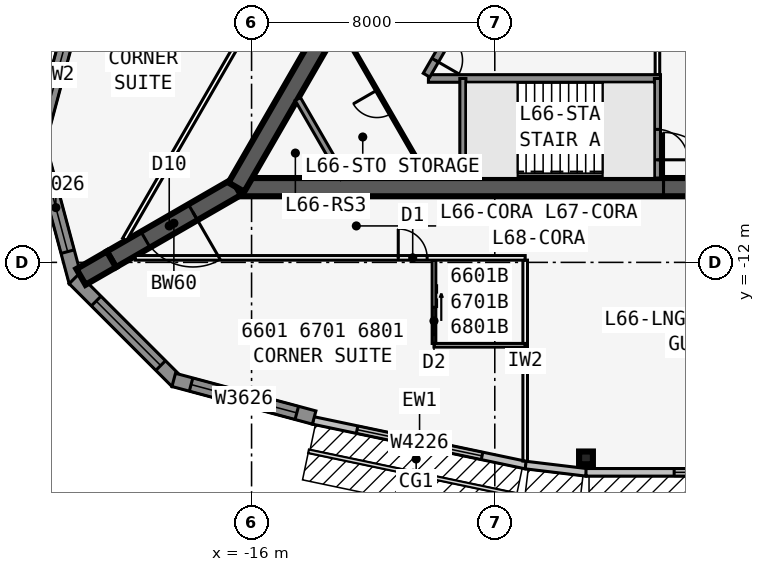
"""IFC4 building model, lengths in metres.
Left out: names, types, materials, properties, quantities, classifications, styles, units other than length and angle.
Written with IfcOpenShell. Run it as: python <this file> out.ifc"""

import sys

from ifc_helpers import new_model, si_unit, direction, frame, frame_2d, origin, origin_2d, place, context, subcontext, project, spatial, polyline, rectangle, i_section, outline, extrude, element, fill, save


model = new_model("IFC4")
c1 = context("Model", 3, precision=1e-05, world=origin(), true_north=direction((0.0, 1.0)))
c2 = subcontext(c1, "Body", "Model", "MODEL_VIEW")
j1 = project(units=[si_unit("LENGTHUNIT", "METRE"), si_unit("PLANEANGLEUNIT", "RADIAN")], contexts=[c1])
p1 = place(None, origin())
s1 = spatial("IfcSite", under=j1, at=p1, CompositionType="ELEMENT")
p2 = place(p1, origin())
s2 = spatial("IfcBuilding", under=s1, at=p2, CompositionType="ELEMENT")
p3 = place(p2, frame((0.0, 0.0, 250.1)))
s3 = spatial("IfcBuildingStorey", under=s2, at=p3, CompositionType="ELEMENT", Elevation=250.1)
p4 = place(p3, frame((-16.5, -9.526, 0.0), z_axis=(0.0, 0.0, 1.0), x_axis=(1.0, 0.0, 0.0)))
e1 = element("IfcWall", 1, at=p4, inside=s3, PredefinedType="SHEAR", context=c2, shape_type="SweptSolid", body=[
    extrude(rectangle(XDim=33.0, YDim=0.6, at=frame_2d((16.5, 0.0))), origin(), (0.0, 0.0, 1.0), 3.6),
])
p5 = place(p4, frame((14.05, 0.0, 0.0)))
e2 = element("IfcOpeningElement", 2, at=p5, cuts=e1, PredefinedType="OPENING", context=c2, shape_type="SweptSolid", body=[
    extrude(rectangle(XDim=1.8, YDim=2.13, at=frame_2d((0.9, 1.065))), frame((0.0, 0.31, 0.0), z_axis=(0.0, -1.0, 0.0), x_axis=(1.0, 0.0, 0.0)), (0.0, 0.0, 1.0), 0.62),
])
p6 = place(p3, frame((-10.183, -5.951, 0.0), z_axis=(0.0, 0.0, 1.0), x_axis=(1.0, 0.0, 0.0)))
e3 = element("IfcWall", 3, at=p6, inside=s3, PredefinedType="SOLIDWALL", context=c2, shape_type="SweptSolid", body=[
    extrude(rectangle(XDim=7.633, YDim=0.25, at=frame_2d((3.816, 0.0))), origin(), (0.0, 0.0, 1.0), 3.435),
])
p7 = place(p3, frame((-9.05, -5.951, 0.0), z_axis=(0.0, 0.0, 1.0), x_axis=(0.0, -1.0, 0.0)))
e4 = element("IfcWall", 4, at=p7, inside=s3, PredefinedType="SOLIDWALL", context=c2, shape_type="SweptSolid", body=[
    extrude(rectangle(XDim=3.275, YDim=0.2, at=frame_2d((1.637, 0.0))), origin(), (0.0, 0.0, 1.0), 3.435),
])
p8 = place(p3, frame((-2.65, -5.951, 0.0), z_axis=(0.0, 0.0, 1.0), x_axis=(0.0, -1.0, 0.0)))
e5 = element("IfcWall", 5, at=p8, inside=s3, PredefinedType="SOLIDWALL", context=c2, shape_type="SweptSolid", body=[
    extrude(rectangle(XDim=3.275, YDim=0.2, at=frame_2d((1.637, 0.0))), origin(), (0.0, 0.0, 1.0), 3.435),
])
p9 = place(p8, frame((1.675, 0.0, 0.0)))
e6 = element("IfcOpeningElement", 6, at=p9, cuts=e5, PredefinedType="OPENING", context=c2, shape_type="SweptSolid", body=[
    extrude(rectangle(XDim=1.0, YDim=2.13, at=frame_2d((0.5, 1.065))), frame((0.0, 0.11, 0.0), z_axis=(0.0, -1.0, 0.0), x_axis=(1.0, 0.0, 0.0)), (0.0, 0.0, 1.0), 0.22),
])
p10 = place(p3, frame((0.0, 19.052, 0.0), z_axis=(0.0, 0.0, 1.0), x_axis=(-0.499999749417, -0.866025548458, 0.0)))
e7 = element("IfcWall", 7, at=p10, inside=s3, PredefinedType="SHEAR", context=c2, shape_type="SweptSolid", body=[
    extrude(rectangle(XDim=33.0, YDim=0.6, at=frame_2d((16.5, 0.0))), origin(), (0.0, 0.0, 1.0), 3.6),
])
p11 = place(p10, frame((14.15, 0.0, 0.0)))
e8 = element("IfcOpeningElement", 8, at=p11, cuts=e7, PredefinedType="OPENING", context=c2, shape_type="SweptSolid", body=[
    extrude(rectangle(XDim=1.8, YDim=2.13, at=frame_2d((0.9, 1.065))), frame((0.0, 0.31, 0.0), z_axis=(0.0, -1.0, 0.0), x_axis=(1.0, 0.0, 0.0)), (0.0, 0.0, 1.0), 0.62),
])
p12 = place(p10, frame((12.6, 0.0, 0.0)))
e9 = element("IfcOpeningElement", 9, at=p12, cuts=e7, PredefinedType="OPENING", context=c2, shape_type="SweptSolid", body=[
    extrude(rectangle(XDim=1.0, YDim=2.13, at=frame_2d((0.5, 1.065))), frame((0.0, 0.31, 0.0), z_axis=(0.0, -1.0, 0.0), x_axis=(1.0, 0.0, 0.0)), (0.0, 0.0, 1.0), 0.62),
])
p13 = place(p3, frame((-4.929, 3.365, 0.0), z_axis=(0.0, 0.0, 1.0), x_axis=(-0.499991433582, -0.866030349552, 0.0)))
e10 = element("IfcWall", 10, at=p13, inside=s3, PredefinedType="SOLIDWALL", context=c2, shape_type="SweptSolid", body=[
    extrude(rectangle(XDim=10.633, YDim=0.25, at=frame_2d((5.316, 0.0))), origin(), (0.0, 0.0, 1.0), 3.435),
])
p14 = place(p13, frame((9.164, 0.0, 0.0)))
e11 = element("IfcOpeningElement", 11, at=p14, cuts=e10, PredefinedType="OPENING", context=c2, shape_type="SweptSolid", body=[
    extrude(rectangle(XDim=0.9, YDim=2.13, at=frame_2d((0.45, 1.065))), frame((0.0, 0.135, 0.0), z_axis=(0.0, -1.0, 0.0), x_axis=(1.0, 0.0, 0.0)), (0.0, 0.0, 1.0), 0.27),
])
p15 = place(p13, frame((1.1, 0.0, 0.0)))
e12 = element("IfcOpeningElement", 12, at=p15, cuts=e10, PredefinedType="OPENING", context=c2, shape_type="SweptSolid", body=[
    extrude(rectangle(XDim=0.9, YDim=2.13, at=frame_2d((0.45, 1.065))), frame((0.0, 0.135, 0.0), z_axis=(0.0, -1.0, 0.0), x_axis=(1.0, 0.0, 0.0)), (0.0, 0.0, 1.0), 0.27),
])
p16 = place(p13, frame((4.0, 0.0, 0.0)))
e13 = element("IfcOpeningElement", 13, at=p16, cuts=e10, PredefinedType="OPENING", context=c2, shape_type="SweptSolid", body=[
    extrude(rectangle(XDim=0.9, YDim=2.13, at=frame_2d((0.45, 1.065))), frame((0.0, 0.135, 0.0), z_axis=(0.0, -1.0, 0.0), x_axis=(1.0, 0.0, 0.0)), (0.0, 0.0, 1.0), 0.27),
])
p17 = place(p3, frame((-16.5, -9.526, 0.0), z_axis=(0.0, 0.0, 1.0), x_axis=(-0.866031398331, -0.499989616998, 0.0)))
e14 = element("IfcWall", 14, at=p17, inside=s3, PredefinedType="SHEAR", context=c2, shape_type="SweptSolid", body=[
    extrude(rectangle(XDim=4.746, YDim=0.6, at=frame_2d((2.373, 0.0))), origin(), (0.0, 0.0, 1.0), 3.6),
])
p18 = place(p17, frame((1.65, 0.0, 0.0)))
e15 = element("IfcOpeningElement", 15, at=p18, cuts=e14, PredefinedType="OPENING", context=c2, shape_type="SweptSolid", body=[
    extrude(rectangle(XDim=1.8, YDim=2.13, at=frame_2d((0.9, 1.065))), frame((0.0, 0.31, 0.0), z_axis=(0.0, -1.0, 0.0), x_axis=(1.0, 0.0, 0.0)), (0.0, 0.0, 1.0), 0.62),
])
p19 = place(p3, frame((-20.61, -11.899, 0.0), z_axis=(0.0, 0.0, 1.0), x_axis=(-0.866009537788, -0.500027479704, 0.0)))
e16 = element("IfcWall", 16, at=p19, inside=s3, PredefinedType="SHEAR", context=c2, shape_type="SweptSolid", body=[
    extrude(rectangle(XDim=1.155, YDim=0.6, at=frame_2d((0.577, 0.0))), origin(), (0.0, 0.0, 1.0), 3.6),
])
p20 = place(p3, frame((-5.0, -18.43, 0.0), z_axis=(0.0, 0.0, 1.0), x_axis=(0.0, -1.0, 0.0)))
e17 = element("IfcColumn", 17, at=p20, inside=s3, PredefinedType="COLUMN", context=c2, shape_type="SweptSolid", body=[
    extrude(i_section(OverallWidth=0.419, OverallDepth=0.455, WebThickness=0.042, FlangeThickness=0.068, at=origin_2d()), origin(), (0.0, 0.0, 1.0), 3.6),
])
p21 = place(p3, frame((-13.974, -17.198, 0.0), z_axis=(0.0, 0.0, 1.0), x_axis=(0.978654320409, -0.205513311355, 0.0)))
e18 = element("IfcWall", 18, at=p21, inside=s3, PredefinedType="STANDARD", context=c2, shape_type="SweptSolid", body=[
    extrude(rectangle(XDim=7.153, YDim=0.25, at=frame_2d((3.576, 0.0))), origin(), (0.0, 0.0, 1.0), 3.435),
])
p22 = place(p21, frame((1.476, 0.0, 0.45)))
e19 = element("IfcOpeningElement", 19, at=p22, cuts=e18, PredefinedType="OPENING", context=c2, shape_type="SweptSolid", body=[
    extrude(rectangle(XDim=4.2, YDim=2.6, at=frame_2d((2.1, 1.3))), frame((0.0, 0.135, 0.0), z_axis=(0.0, -1.0, 0.0), x_axis=(1.0, 0.0, 0.0)), (0.0, 0.0, 1.0), 0.27),
])
p23 = place(p3, frame((-6.985, -18.667, 0.0), z_axis=(0.0, 0.0, 1.0), x_axis=(0.992877411981, -0.119140441403, 0.0)))
e20 = element("IfcWall", 20, at=p23, inside=s3, PredefinedType="STANDARD", context=c2, shape_type="SweptSolid", body=[
    extrude(rectangle(XDim=2.014, YDim=0.25, at=frame_2d((1.007, 0.0))), origin(), (0.0, 0.0, 1.0), 3.435),
])
p24 = place(p3, frame((-5.0, -18.906, 0.0), z_axis=(0.0, 0.0, 1.0), x_axis=(1.0, 0.0, 0.0)))
e21 = element("IfcWall", 21, at=p24, inside=s3, PredefinedType="STANDARD", context=c2, shape_type="SweptSolid", body=[
    extrude(rectangle(XDim=10.0, YDim=0.25, at=frame_2d((5.0, 0.0))), origin(), (0.0, 0.0, 1.0), 3.435),
])
p25 = place(p24, frame((2.9, 0.0, 0.45)))
e22 = element("IfcOpeningElement", 22, at=p25, cuts=e21, PredefinedType="OPENING", context=c2, shape_type="SweptSolid", body=[
    extrude(rectangle(XDim=4.2, YDim=2.6, at=frame_2d((2.1, 1.3))), frame((0.0, 0.135, 0.0), z_axis=(0.0, -1.0, 0.0), x_axis=(1.0, 0.0, 0.0)), (0.0, 0.0, 1.0), 0.27),
])
p26 = place(p3, frame((-21.783, -3.522, 0.0), z_axis=(0.0, 0.0, 1.0), x_axis=(-0.25880328844, -0.965930048136, 0.0)))
e23 = element("IfcWall", 23, at=p26, inside=s3, PredefinedType="SOLIDWALL", context=c2, shape_type="SweptSolid", body=[
    extrude(rectangle(XDim=4.782, YDim=0.45, at=frame_2d((2.391, 0.0))), origin(), (0.0, 0.0, 1.0), 3.435),
])
p27 = place(p26, frame((0.591, 0.0, 0.45)))
e24 = element("IfcOpeningElement", 24, at=p27, cuts=e23, PredefinedType="OPENING", context=c2, shape_type="SweptSolid", body=[
    extrude(rectangle(XDim=3.6, YDim=2.6, at=frame_2d((1.8, 1.3))), frame((0.0, 0.235, 0.0), z_axis=(0.0, -1.0, 0.0), x_axis=(1.0, 0.0, 0.0)), (0.0, 0.0, 1.0), 0.47),
])
p28 = place(p3, frame((-23.02, -8.025, 0.0), z_axis=(0.0, 0.0, 1.0), x_axis=(0.25880328844, -0.965930048136, 0.0)))
e25 = element("IfcWall", 25, at=p28, inside=s3, PredefinedType="SOLIDWALL", context=c2, shape_type="SweptSolid", body=[
    extrude(outline(polyline([(4.782, 0.225), (4.722, 0.225), (4.375, 0.132), (4.351, 0.225), (0.0, 0.225), (0.0, -0.225), (4.782, -0.225), (4.782, 0.225)])), origin(), (0.0, 0.0, 1.0), 3.435),
])
p29 = place(p28, frame((0.75, 0.0, 0.45)))
e26 = element("IfcOpeningElement", 26, at=p29, cuts=e25, PredefinedType="OPENING", context=c2, shape_type="SweptSolid", body=[
    extrude(rectangle(XDim=3.0, YDim=2.6, at=frame_2d((1.5, 1.3))), frame((0.0, 0.235, 0.0), z_axis=(0.0, -1.0, 0.0), x_axis=(1.0, 0.0, 0.0)), (0.0, 0.0, 1.0), 0.47),
])
p30 = place(p3, frame((-21.841, -12.542, 0.0), z_axis=(0.0, 0.0, 1.0), x_axis=(0.707081252484, -0.707132308968, 0.0)))
e27 = element("IfcWall", 27, at=p30, inside=s3, PredefinedType="SOLIDWALL", context=c2, shape_type="SweptSolid", body=[
    extrude(outline(polyline([(4.782, 0.225), (0.431, 0.225), (0.406, 0.132), (0.059, 0.225), (0.0, 0.225), (0.0, -0.225), (4.782, -0.225), (4.782, 0.225)])), origin(), (0.0, 0.0, 1.0), 3.435),
])
p31 = place(p30, frame((1.031, 0.0, 0.45)))
e28 = element("IfcOpeningElement", 28, at=p31, cuts=e27, PredefinedType="OPENING", context=c2, shape_type="SweptSolid", body=[
    extrude(rectangle(XDim=3.0, YDim=2.6, at=frame_2d((1.5, 1.3))), frame((0.0, 0.235, 0.0), z_axis=(0.0, -1.0, 0.0), x_axis=(1.0, 0.0, 0.0)), (0.0, 0.0, 1.0), 0.47),
])
p32 = place(p3, frame((-18.561, -15.865, 0.0), z_axis=(0.0, 0.0, 1.0), x_axis=(0.965913862671, -0.258863689806, 0.0)))
e29 = element("IfcWall", 29, at=p32, inside=s3, PredefinedType="SOLIDWALL", context=c2, shape_type="SweptSolid", body=[
    extrude(rectangle(XDim=4.782, YDim=0.45, at=frame_2d((2.391, 0.0))), origin(), (0.0, 0.0, 1.0), 3.435),
])
p33 = place(p32, frame((0.591, 0.0, 0.45)))
e30 = element("IfcOpeningElement", 30, at=p33, cuts=e29, PredefinedType="OPENING", context=c2, shape_type="SweptSolid", body=[
    extrude(rectangle(XDim=3.6, YDim=2.6, at=frame_2d((1.8, 1.3))), frame((0.0, 0.235, 0.0), z_axis=(0.0, -1.0, 0.0), x_axis=(1.0, 0.0, 0.0)), (0.0, 0.0, 1.0), 0.47),
])
p34 = place(p3, frame((-19.827, -11.851, 0.0), z_axis=(0.0, 0.0, 1.0), x_axis=(1.0, 0.0, 0.0)))
e31 = element("IfcWall", 31, at=p34, inside=s3, PredefinedType="PARTITIONING", context=c2, shape_type="SweptSolid", body=[
    extrude(rectangle(XDim=12.827, YDim=0.15, at=frame_2d((6.414, 0.0))), origin(), (0.0, 0.0, 1.0), 3.435),
])
p35 = place(p34, frame((8.652, 0.0, 0.0)))
e32 = element("IfcOpeningElement", 32, at=p35, cuts=e31, PredefinedType="OPENING", context=c2, shape_type="SweptSolid", body=[
    extrude(rectangle(XDim=0.95, YDim=2.13, at=frame_2d((0.475, 1.065))), frame((0.0, 0.085, 0.0), z_axis=(0.0, -1.0, 0.0), x_axis=(1.0, 0.0, 0.0)), (0.0, 0.0, 1.0), 0.17),
])
p36 = place(p3, frame((-7.0, -11.926, 0.0), z_axis=(0.0, 0.0, 1.0), x_axis=(0.0, -1.0, 0.0)))
e33 = element("IfcWall", 33, at=p36, inside=s3, PredefinedType="PARTITIONING", context=c2, shape_type="SweptSolid", body=[
    extrude(rectangle(XDim=6.609, YDim=0.15, at=frame_2d((3.304, 0.0))), origin(), (0.0, 0.0, 1.0), 2.678),
])
p37 = place(p3, frame((-10.0, -14.726, 0.0), z_axis=(0.0, 0.0, 1.0), x_axis=(1.0, 0.0, 0.0)))
e34 = element("IfcWall", 34, at=p37, inside=s3, PredefinedType="PLUMBINGWALL", context=c2, shape_type="SweptSolid", body=[
    extrude(rectangle(XDim=3.0, YDim=0.12, at=frame_2d((1.5, 0.0))), origin(), (0.0, 0.0, 1.0), 3.435),
])
p38 = place(p3, frame((-10.0, -11.926, 0.0), z_axis=(0.0, 0.0, 1.0), x_axis=(0.0, -1.0, 0.0)))
e35 = element("IfcWall", 35, at=p38, inside=s3, PredefinedType="PLUMBINGWALL", context=c2, shape_type="SweptSolid", body=[
    extrude(rectangle(XDim=2.74, YDim=0.12, at=frame_2d((1.37, 0.0))), origin(), (0.0, 0.0, 1.0), 3.435),
])
p39 = place(p38, frame((1.55, 0.0, 0.0)))
e36 = element("IfcOpeningElement", 36, at=p39, cuts=e35, PredefinedType="OPENING", context=c2, shape_type="SweptSolid", body=[
    extrude(rectangle(XDim=0.9, YDim=2.13, at=frame_2d((0.45, 1.065))), frame((0.0, 0.07, 0.0), z_axis=(0.0, -1.0, 0.0), x_axis=(1.0, 0.0, 0.0)), (0.0, 0.0, 1.0), 0.14),
])
p40 = place(p3, frame((-0.35, 23.096, 0.0), z_axis=(0.0, 0.0, 1.0), x_axis=(-0.499998875317, -0.866026053119, 0.0)))
e37 = element("IfcWall", 37, at=p40, inside=s3, PredefinedType="PARTITIONING", context=c2, shape_type="SweptSolid", body=[
    extrude(rectangle(XDim=39.654, YDim=0.15, at=frame_2d((19.827, 0.0))), origin(), (0.0, 0.0, 1.0), 3.435),
])
p41 = place(p40, frame((8.652, 0.0, 0.0)))
e38 = element("IfcOpeningElement", 38, at=p41, cuts=e37, PredefinedType="OPENING", context=c2, shape_type="SweptSolid", body=[
    extrude(rectangle(XDim=0.95, YDim=2.13, at=frame_2d((0.475, 1.065))), frame((0.0, 0.085, 0.0), z_axis=(0.0, -1.0, 0.0), x_axis=(1.0, 0.0, 0.0)), (0.0, 0.0, 1.0), 0.17),
])
p42 = place(p40, frame((15.852, 0.0, 0.0)))
e39 = element("IfcOpeningElement", 39, at=p42, cuts=e37, PredefinedType="OPENING", context=c2, shape_type="SweptSolid", body=[
    extrude(rectangle(XDim=0.95, YDim=2.13, at=frame_2d((0.475, 1.065))), frame((0.0, 0.085, 0.0), z_axis=(0.0, -1.0, 0.0), x_axis=(1.0, 0.0, 0.0)), (0.0, 0.0, 1.0), 0.17),
])
p43 = place(p40, frame((30.052, 0.0, 0.0)))
e40 = element("IfcOpeningElement", 40, at=p43, cuts=e37, PredefinedType="OPENING", context=c2, shape_type="SweptSolid", body=[
    extrude(rectangle(XDim=0.95, YDim=2.13, at=frame_2d((0.475, 1.065))), frame((0.0, 0.085, 0.0), z_axis=(0.0, -1.0, 0.0), x_axis=(1.0, 0.0, 0.0)), (0.0, 0.0, 1.0), 0.17),
])
p44 = place(p3, frame((-2.65, -5.826, 0.0), z_axis=(0.0, 0.0, 1.0), x_axis=(0.0, 1.0, 0.0)))
e41 = element("IfcWall", 41, at=p44, inside=s3, PredefinedType="PARTITIONING", context=c2, shape_type="SweptSolid", body=[
    extrude(rectangle(XDim=2.5, YDim=0.15, at=frame_2d((1.25, 0.0))), origin(), (0.0, 0.0, 1.0), 3.435),
])
p45 = place(p3, frame((-12.978, -9.226, 0.0), z_axis=(0.0, 0.0, 1.0), x_axis=(-0.499952404951, 0.866052881055, 0.0)))
e42 = element("IfcWall", 42, at=p45, inside=s3, PredefinedType="SOLIDWALL", context=c2, shape_type="SweptSolid", body=[
    extrude(rectangle(XDim=3.002, YDim=0.2, at=frame_2d((1.501, 0.0))), origin(), (0.0, 0.0, 1.0), 3.435),
])
p46 = place(p3, frame((-10.207, -9.226, 0.0), z_axis=(0.0, 0.0, 1.0), x_axis=(-0.500027479704, 0.866009537788, 0.0)))
e43 = element("IfcWall", 43, at=p46, inside=s3, PredefinedType="PARTITIONING", context=c2, shape_type="SweptSolid", body=[
    extrude(rectangle(XDim=5.774, YDim=0.1, at=frame_2d((2.887, 0.0))), origin(), (0.0, 0.0, 1.0), 3.435),
])
p47 = place(p46, frame((2.437, 0.0, 0.0)))
e44 = element("IfcOpeningElement", 44, at=p47, cuts=e43, PredefinedType="OPENING", context=c2, shape_type="SweptSolid", body=[
    extrude(rectangle(XDim=0.9, YDim=2.13, at=frame_2d((0.45, 1.065))), frame((0.0, 0.06, 0.0), z_axis=(0.0, -1.0, 0.0), x_axis=(1.0, 0.0, 0.0)), (0.0, 0.0, 1.0), 0.12),
])
p48 = place(p3, frame((-7.247, -7.576, 0.0), z_axis=(0.0, 0.0, 1.0), x_axis=(1.0, 0.0, 0.0)))
e45 = element("IfcWall", 45, at=p48, inside=s3, PredefinedType="SOLIDWALL", context=c2, shape_type="SweptSolid", body=[
    extrude(rectangle(XDim=2.794, YDim=0.1, at=frame_2d((1.397, 0.0))), origin(), (0.0, 0.0, 1.0), 3.6),
])
p49 = place(p22, origin())
e46 = element("IfcWindow", 46, at=p49, inside=s3, PartitioningType="SINGLE_PANEL", PredefinedType="WINDOW", context=c2, shape_type="SweptSolid", body=[
    extrude(rectangle(XDim=4.2, YDim=2.6, at=frame_2d((2.1, 1.3))), frame((0.0, 0.03, 0.0), z_axis=(0.0, -1.0, 0.0), x_axis=(1.0, 0.0, 0.0)), (0.0, 0.0, 1.0), 0.06),
])
fill(e19, e46)
p50 = place(p25, origin())
e47 = element("IfcWindow", 47, at=p50, inside=s3, PartitioningType="SINGLE_PANEL", PredefinedType="WINDOW", context=c2, shape_type="SweptSolid", body=[
    extrude(rectangle(XDim=4.2, YDim=2.6, at=frame_2d((2.1, 1.3))), frame((0.0, 0.03, 0.0), z_axis=(0.0, -1.0, 0.0), x_axis=(1.0, 0.0, 0.0)), (0.0, 0.0, 1.0), 0.06),
])
fill(e22, e47)
p51 = place(p27, origin())
e48 = element("IfcWindow", 48, at=p51, inside=s3, PartitioningType="SINGLE_PANEL", PredefinedType="WINDOW", context=c2, shape_type="SweptSolid", body=[
    extrude(rectangle(XDim=3.6, YDim=2.6, at=frame_2d((1.8, 1.3))), frame((0.0, 0.03, 0.0), z_axis=(0.0, -1.0, 0.0), x_axis=(1.0, 0.0, 0.0)), (0.0, 0.0, 1.0), 0.06),
])
fill(e24, e48)
p52 = place(p29, origin())
e49 = element("IfcWindow", 49, at=p52, inside=s3, PartitioningType="SINGLE_PANEL", PredefinedType="WINDOW", context=c2, shape_type="SweptSolid", body=[
    extrude(rectangle(XDim=3.0, YDim=2.6, at=frame_2d((1.5, 1.3))), frame((0.0, 0.03, 0.0), z_axis=(0.0, -1.0, 0.0), x_axis=(1.0, 0.0, 0.0)), (0.0, 0.0, 1.0), 0.06),
])
fill(e26, e49)
p53 = place(p31, origin())
e50 = element("IfcWindow", 50, at=p53, inside=s3, PartitioningType="SINGLE_PANEL", PredefinedType="WINDOW", context=c2, shape_type="SweptSolid", body=[
    extrude(rectangle(XDim=3.0, YDim=2.6, at=frame_2d((1.5, 1.3))), frame((0.0, 0.03, 0.0), z_axis=(0.0, -1.0, 0.0), x_axis=(1.0, 0.0, 0.0)), (0.0, 0.0, 1.0), 0.06),
])
fill(e28, e50)
p54 = place(p33, origin())
e51 = element("IfcWindow", 51, at=p54, inside=s3, PartitioningType="SINGLE_PANEL", PredefinedType="WINDOW", context=c2, shape_type="SweptSolid", body=[
    extrude(rectangle(XDim=3.6, YDim=2.6, at=frame_2d((1.8, 1.3))), frame((0.0, 0.03, 0.0), z_axis=(0.0, -1.0, 0.0), x_axis=(1.0, 0.0, 0.0)), (0.0, 0.0, 1.0), 0.06),
])
fill(e30, e51)
p55 = place(p39, origin())
e52 = element("IfcDoor", 52, at=p55, inside=s3, OperationType="SLIDING_TO_LEFT", PredefinedType="DOOR", context=c2, shape_type="SweptSolid", body=[
    extrude(rectangle(XDim=0.9, YDim=2.13, at=frame_2d((0.45, 1.065))), frame((0.0, 0.025, 0.0), z_axis=(0.0, -1.0, 0.0), x_axis=(1.0, 0.0, 0.0)), (0.0, 0.0, 1.0), 0.05),
])
fill(e36, e52)
p56 = place(p35, origin())
e53 = element("IfcDoor", 53, at=p56, inside=s3, OperationType="SINGLE_SWING_LEFT", PredefinedType="DOOR", context=c2, shape_type="SweptSolid", body=[
    extrude(rectangle(XDim=0.95, YDim=2.13, at=frame_2d((0.475, 1.065))), frame((0.0, 0.025, 0.0), z_axis=(0.0, -1.0, 0.0), x_axis=(1.0, 0.0, 0.0)), (0.0, 0.0, 1.0), 0.05),
])
fill(e32, e53)
p57 = place(p5, origin())
e54 = element("IfcDoor", 54, at=p57, inside=s3, OperationType="DOUBLE_DOOR_SINGLE_SWING", PredefinedType="DOOR", context=c2, shape_type="SweptSolid", body=[
    extrude(rectangle(XDim=1.8, YDim=2.13, at=frame_2d((0.9, 1.065))), frame((0.0, 0.025, 0.0), z_axis=(0.0, -1.0, 0.0), x_axis=(1.0, 0.0, 0.0)), (0.0, 0.0, 1.0), 0.05),
])
fill(e2, e54)
p58 = place(p9, origin())
e55 = element("IfcDoor", 55, at=p58, inside=s3, OperationType="SINGLE_SWING_RIGHT", PredefinedType="DOOR", context=c2, shape_type="SweptSolid", body=[
    extrude(rectangle(XDim=1.0, YDim=2.13, at=frame_2d((0.5, 1.065))), frame((0.0, 0.025, 0.0), z_axis=(0.0, -1.0, 0.0), x_axis=(1.0, 0.0, 0.0)), (0.0, 0.0, 1.0), 0.05),
])
fill(e6, e55)
p59 = place(p18, origin())
e56 = element("IfcDoor", 56, at=p59, inside=s3, OperationType="DOUBLE_DOOR_DOUBLE_SWING", PredefinedType="DOOR", context=c2, shape_type="SweptSolid", body=[
    extrude(rectangle(XDim=1.8, YDim=2.13, at=frame_2d((0.9, 1.065))), frame((0.0, 0.025, 0.0), z_axis=(0.0, -1.0, 0.0), x_axis=(1.0, 0.0, 0.0)), (0.0, 0.0, 1.0), 0.05),
])
fill(e15, e56)
p60 = place(p47, origin())
e57 = element("IfcDoor", 57, at=p60, inside=s3, OperationType="SINGLE_SWING_RIGHT", PredefinedType="DOOR", context=c2, shape_type="SweptSolid", body=[
    extrude(rectangle(XDim=0.9, YDim=2.13, at=frame_2d((0.45, 1.065))), frame((0.0, 0.025, 0.0), z_axis=(0.0, -1.0, 0.0), x_axis=(1.0, 0.0, 0.0)), (0.0, 0.0, 1.0), 0.05),
])
fill(e44, e57)
p61 = place(p14, origin())
e58 = element("IfcDoor", 58, at=p61, inside=s3, OperationType="SINGLE_SWING_RIGHT", PredefinedType="DOOR", context=c2, shape_type="SweptSolid", body=[
    extrude(rectangle(XDim=0.9, YDim=2.13, at=frame_2d((0.45, 1.065))), frame((0.0, 0.025, 0.0), z_axis=(0.0, -1.0, 0.0), x_axis=(1.0, 0.0, 0.0)), (0.0, 0.0, 1.0), 0.05),
])
fill(e11, e58)
save(model, sys.argv[1])
